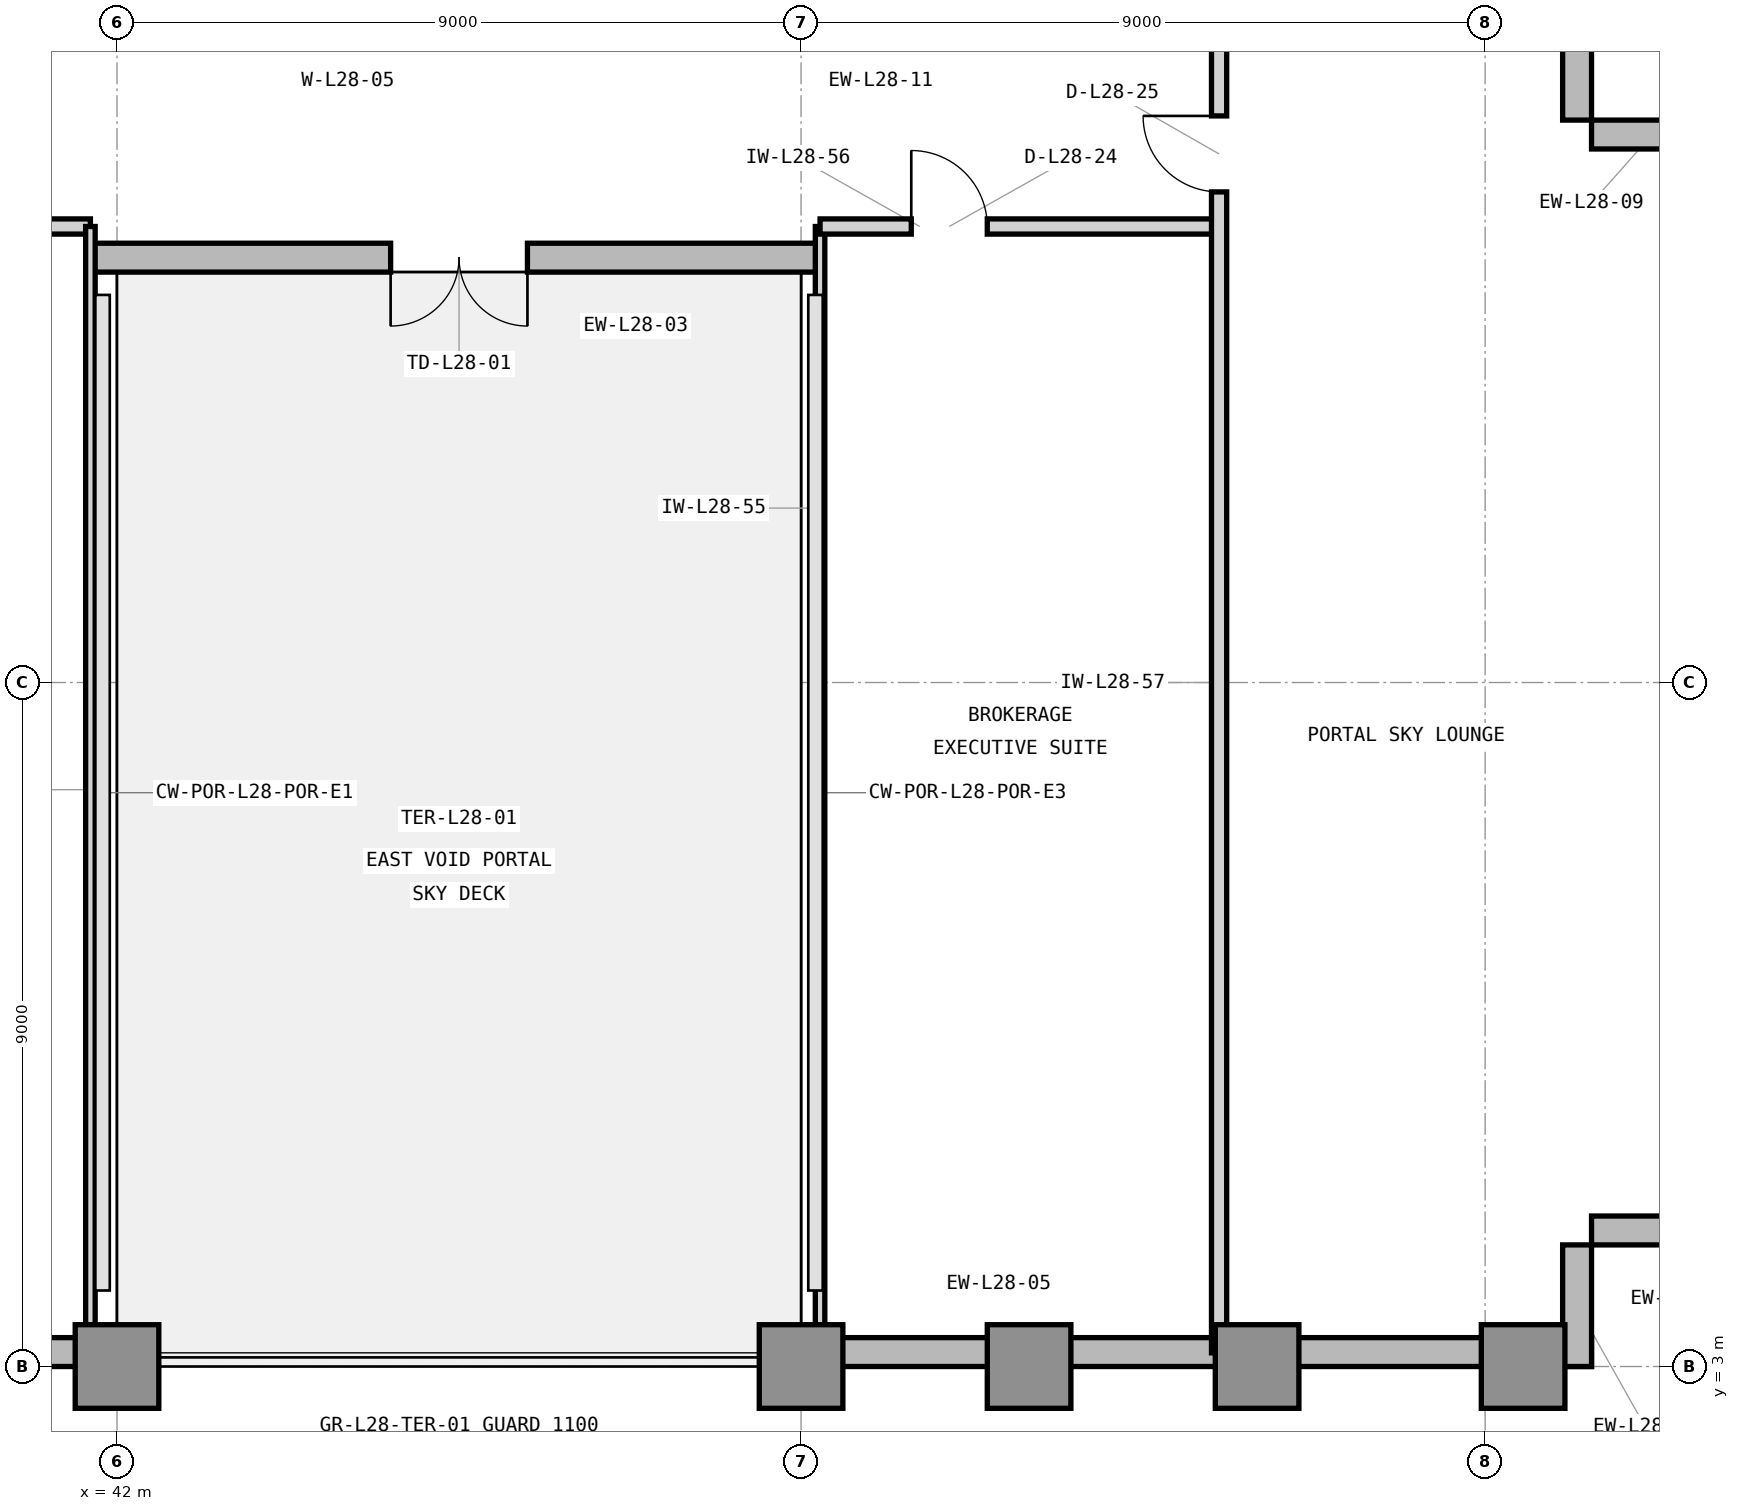
"""IFC4 building model, lengths in metres.
Left out: names, types, materials, properties, quantities, classifications, styles, units other than length and angle.
Written with IfcOpenShell. Run it as: python <this file> out.ifc"""

import sys

from ifc_helpers import new_model, si_unit, direction, frame, frame_2d, origin, origin_2d, place, context, subcontext, project, spatial, rectangle, extrude, element, fill, save


model = new_model("IFC4")
c1 = context("Model", 3, precision=1e-05, world=origin(), true_north=direction((0.0, 1.0)))
c2 = subcontext(c1, "Body", "Model", "MODEL_VIEW")
j1 = project(units=[si_unit("LENGTHUNIT", "METRE"), si_unit("PLANEANGLEUNIT", "RADIAN")], contexts=[c1])
p1 = place(None, origin())
s1 = spatial("IfcSite", under=j1, at=p1, CompositionType="ELEMENT")
p2 = place(p1, origin())
s2 = spatial("IfcBuilding", under=s1, at=p2, CompositionType="ELEMENT")
p3 = place(p2, frame((0.0, 0.0, 120.6)))
s3 = spatial("IfcBuildingStorey", under=s2, at=p3, CompositionType="ELEMENT", Elevation=120.6)
for number, where, z_axis, x_axis in (
    (1, (42.0, 3.0, 0.0), (0.0, 0.0, 1.0), (1.0, 0.0, 0.0)),
    (2, (51.0, 3.0, 0.0), (0.0, 0.0, 1.0), (1.0, 0.0, 0.0)),
    (3, (54.0, 3.0, 0.0), (0.0, 0.0, 1.0), (1.0, 0.0, 0.0)),
    (4, (57.0, 3.0, 0.0), (0.0, 0.0, 1.0), (1.0, 0.0, 0.0)),
    (5, (60.5, 3.0, 0.0), (0.0, 0.0, 1.0), (1.0, 0.0, 0.0)),
):
    element("IfcColumn", number, at=place(p3, frame(where, z_axis=z_axis, x_axis=x_axis)), inside=s3, PredefinedType="COLUMN", context=c2, shape_type="SweptSolid", body=[
        extrude(rectangle(XDim=1.1, YDim=1.1, at=origin_2d()), origin(), (0.0, 0.0, 1.0), 3.9),
    ])
p4 = place(p3, frame((23.9, 3.19, 0.0), z_axis=(0.0, 0.0, 1.0), x_axis=(1.0, 0.0, 0.0)))
e6 = element("IfcWall", 6, at=p4, inside=s3, PredefinedType="STANDARD", context=c2, shape_type="SweptSolid", body=[
    extrude(rectangle(XDim=18.1, YDim=0.38, at=frame_2d((9.05, 0.0))), origin(), (0.0, 0.0, 1.0), 3.7),
])
p5 = place(p4, frame((5.538, 0.0, 0.85)))
e7 = element("IfcOpeningElement", 7, at=p5, cuts=e6, PredefinedType="OPENING", context=c2, shape_type="SweptSolid", body=[
    extrude(rectangle(XDim=2.5, YDim=2.25, at=frame_2d((1.25, 1.125))), frame((0.0, 0.2, 0.0), z_axis=(0.0, -1.0, 0.0), x_axis=(1.0, 0.0, 0.0)), (0.0, 0.0, 1.0), 0.4),
])
p6 = place(p4, frame((14.938, 0.0, 0.85)))
e8 = element("IfcOpeningElement", 8, at=p6, cuts=e6, PredefinedType="OPENING", context=c2, shape_type="SweptSolid", body=[
    extrude(rectangle(XDim=1.8, YDim=2.25, at=frame_2d((0.9, 1.125))), frame((0.0, 0.2, 0.0), z_axis=(0.0, -1.0, 0.0), x_axis=(1.0, 0.0, 0.0)), (0.0, 0.0, 1.0), 0.4),
])
p7 = place(p4, frame((1.1, 0.0, 0.85)))
e9 = element("IfcOpeningElement", 9, at=p7, cuts=e6, PredefinedType="OPENING", context=c2, shape_type="SweptSolid", body=[
    extrude(rectangle(XDim=1.2, YDim=2.25, at=frame_2d((0.6, 1.125))), frame((0.0, 0.2, 0.0), z_axis=(0.0, -1.0, 0.0), x_axis=(1.0, 0.0, 0.0)), (0.0, 0.0, 1.0), 0.4),
])
p8 = place(p3, frame((41.7, 17.59, 0.0), z_axis=(0.0, 0.0, 1.0), x_axis=(1.0, 0.0, 0.0)))
e10 = element("IfcWall", 10, at=p8, inside=s3, PredefinedType="STANDARD", context=c2, shape_type="SweptSolid", body=[
    extrude(rectangle(XDim=9.5, YDim=0.38, at=frame_2d((4.75, 0.0))), origin(), (0.0, 0.0, 1.0), 3.7),
])
p9 = place(p8, frame((3.9, 0.0, 0.0)))
e11 = element("IfcOpeningElement", 11, at=p9, cuts=e10, PredefinedType="OPENING", context=c2, shape_type="SweptSolid", body=[
    extrude(rectangle(XDim=1.8, YDim=2.35, at=frame_2d((0.9, 1.175))), frame((0.0, 0.2, 0.0), z_axis=(0.0, -1.0, 0.0), x_axis=(1.0, 0.0, 0.0)), (0.0, 0.0, 1.0), 0.4),
])
p10 = place(p3, frame((51.0, 3.19, 0.0), z_axis=(0.0, 0.0, 1.0), x_axis=(1.0, 0.0, 0.0)))
e12 = element("IfcWall", 12, at=p10, inside=s3, PredefinedType="STANDARD", context=c2, shape_type="SweptSolid", body=[
    extrude(rectangle(XDim=10.4, YDim=0.38, at=frame_2d((5.2, 0.0))), origin(), (0.0, 0.0, 1.0), 3.7),
])
for number, where, z_axis, x_axis in (
    (13, (61.21, 3.0, 0.0), (0.0, 0.0, 1.0), (0.0, 1.0, 0.0)),
    (14, (61.4, 4.79, 0.0), (0.0, 0.0, 1.0), (1.0, 0.0, 0.0)),
    (15, (63.0, 19.21, 0.0), (0.0, 0.0, 1.0), (-1.0, 0.0, 0.0)),
    (16, (61.21, 19.4, 0.0), (0.0, 0.0, 1.0), (0.0, 1.0, 0.0)),
):
    element("IfcWall", number, at=place(p3, frame(where, z_axis=z_axis, x_axis=x_axis)), inside=s3, PredefinedType="STANDARD", context=c2, shape_type="SweptSolid", body=[
        extrude(rectangle(XDim=1.6, YDim=0.38, at=frame_2d((0.8, 0.0))), origin(), (0.0, 0.0, 1.0), 3.7),
    ])
p11 = place(p3, frame((34.2, 18.0, 0.0), z_axis=(0.0, 0.0, 1.0), x_axis=(1.0, 0.0, 0.0)))
e17 = element("IfcWall", 17, at=p11, inside=s3, PredefinedType="PARTITIONING", context=c2, shape_type="SweptSolid", body=[
    extrude(rectangle(XDim=7.45, YDim=0.2, at=frame_2d((3.725, 0.0))), origin(), (0.0, 0.0, 1.0), 3.227),
])
p12 = place(p11, frame((3.225, 0.0, 0.0)))
e18 = element("IfcOpeningElement", 18, at=p12, cuts=e17, PredefinedType="OPENING", context=c2, shape_type="SweptSolid", body=[
    extrude(rectangle(XDim=1.0, YDim=2.15, at=frame_2d((0.5, 1.075))), frame((0.0, 0.11, 0.0), z_axis=(0.0, -1.0, 0.0), x_axis=(1.0, 0.0, 0.0)), (0.0, 0.0, 1.0), 0.22),
])
for number, where, z_axis, x_axis in (
    (19, (41.65, 3.18, 0.0), (0.0, 0.0, 1.0), (0.0, 1.0, 0.0)),
    (20, (51.25, 3.18, 0.0), (0.0, 0.0, 1.0), (0.0, 1.0, 0.0)),
):
    element("IfcWall", number, at=place(p3, frame(where, z_axis=z_axis, x_axis=x_axis)), inside=s3, PredefinedType="PARTITIONING", context=c2, shape_type="SweptSolid", body=[
        extrude(rectangle(XDim=14.82, YDim=0.125, at=frame_2d((7.41, 0.0))), origin(), (0.0, 0.0, 1.0), 3.69),
    ])
p13 = place(p3, frame((51.25, 18.0, 0.0), z_axis=(0.0, 0.0, 1.0), x_axis=(1.0, 0.0, 0.0)))
e21 = element("IfcWall", 21, at=p13, inside=s3, PredefinedType="PARTITIONING", context=c2, shape_type="SweptSolid", body=[
    extrude(rectangle(XDim=5.25, YDim=0.2, at=frame_2d((2.625, 0.0))), origin(), (0.0, 0.0, 1.0), 3.227),
])
p14 = place(p13, frame((1.2, 0.0, 0.0)))
e22 = element("IfcOpeningElement", 22, at=p14, cuts=e21, PredefinedType="OPENING", context=c2, shape_type="SweptSolid", body=[
    extrude(rectangle(XDim=1.0, YDim=2.15, at=frame_2d((0.5, 1.075))), frame((0.0, 0.11, 0.0), z_axis=(0.0, -1.0, 0.0), x_axis=(1.0, 0.0, 0.0)), (0.0, 0.0, 1.0), 0.22),
])
p15 = place(p3, frame((56.5, 3.18, 0.0), z_axis=(0.0, 0.0, 1.0), x_axis=(0.0, 1.0, 0.0)))
e23 = element("IfcWall", 23, at=p15, inside=s3, PredefinedType="PARTITIONING", context=c2, shape_type="SweptSolid", body=[
    extrude(rectangle(XDim=17.64, YDim=0.2, at=frame_2d((8.82, 0.0))), origin(), (0.0, 0.0, 1.0), 3.69),
])
p16 = place(p15, frame((15.275, 0.0, 0.0)))
e24 = element("IfcOpeningElement", 24, at=p16, cuts=e23, PredefinedType="OPENING", context=c2, shape_type="SweptSolid", body=[
    extrude(rectangle(XDim=1.0, YDim=2.15, at=frame_2d((0.5, 1.075))), frame((0.0, 0.11, 0.0), z_axis=(0.0, -1.0, 0.0), x_axis=(1.0, 0.0, 0.0)), (0.0, 0.0, 1.0), 0.22),
])
p17 = place(p9, frame((1.8, 0.0, 0.0), z_axis=(0.0, 0.0, 1.0), x_axis=(-1.0, 0.0, 0.0)))
e25 = element("IfcDoor", 25, at=p17, inside=s3, OperationType="DOUBLE_DOOR_SINGLE_SWING", PredefinedType="DOOR", context=c2, shape_type="SweptSolid", body=[
    extrude(rectangle(XDim=1.8, YDim=2.35, at=frame_2d((0.9, 1.175))), frame((0.0, 0.025, 0.0), z_axis=(0.0, -1.0, 0.0), x_axis=(1.0, 0.0, 0.0)), (0.0, 0.0, 1.0), 0.05),
])
fill(e11, e25)
p18 = place(p14, origin())
e26 = element("IfcDoor", 26, at=p18, inside=s3, OperationType="SINGLE_SWING_LEFT", PredefinedType="DOOR", context=c2, shape_type="SweptSolid", body=[
    extrude(rectangle(XDim=1.0, YDim=2.15, at=frame_2d((0.5, 1.075))), frame((0.0, 0.025, 0.0), z_axis=(0.0, -1.0, 0.0), x_axis=(1.0, 0.0, 0.0)), (0.0, 0.0, 1.0), 0.05),
])
fill(e22, e26)
p19 = place(p16, origin())
e27 = element("IfcDoor", 27, at=p19, inside=s3, OperationType="SINGLE_SWING_RIGHT", PredefinedType="DOOR", context=c2, shape_type="SweptSolid", body=[
    extrude(rectangle(XDim=1.0, YDim=2.15, at=frame_2d((0.5, 1.075))), frame((0.0, 0.025, 0.0), z_axis=(0.0, -1.0, 0.0), x_axis=(1.0, 0.0, 0.0)), (0.0, 0.0, 1.0), 0.05),
])
fill(e24, e27)
save(model, sys.argv[1])
